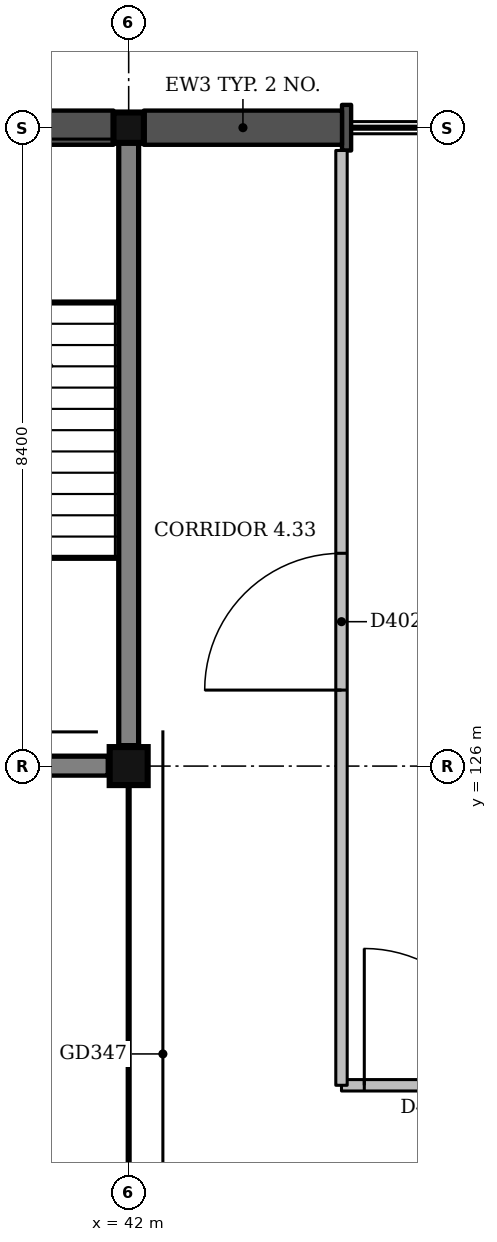
"""IFC4 building model, lengths in metres.
Left out: names, types, materials, properties, quantities, classifications, styles, units other than length and angle.
Written with IfcOpenShell. Run it as: python <this file> out.ifc"""

import sys

from ifc_helpers import new_model, si_unit, direction, frame, frame_2d, origin, origin_2d, place, context, subcontext, project, spatial, rectangle, extrude, element, fill, save


model = new_model("IFC4")
c1 = context("Model", 3, precision=1e-05, world=origin(), true_north=direction((0.0, 1.0)))
c2 = subcontext(c1, "Body", "Model", "MODEL_VIEW")
j1 = project(units=[si_unit("LENGTHUNIT", "METRE"), si_unit("PLANEANGLEUNIT", "RADIAN")], contexts=[c1])
p1 = place(None, origin())
s1 = spatial("IfcSite", under=j1, at=p1, CompositionType="ELEMENT")
p2 = place(p1, origin())
s2 = spatial("IfcBuilding", under=s1, at=p2, CompositionType="ELEMENT")
p3 = place(p2, frame((0.0, 0.0, 18.0)))
s3 = spatial("IfcBuildingStorey", under=s2, at=p3, CompositionType="ELEMENT", Elevation=18.0)
p4 = place(p3, frame((42.0, 126.0, 0.0), z_axis=(0.0, 0.0, 1.0), x_axis=(1.0, 0.0, 0.0)))
e1 = element("IfcColumn", 1, at=p4, inside=s3, PredefinedType="COLUMN", context=c2, shape_type="SweptSolid", body=[
    extrude(rectangle(XDim=0.5, YDim=0.5, at=origin_2d()), origin(), (0.0, 0.0, 1.0), 4.5),
])
p5 = place(p3, frame((42.0, 134.4, 0.0), z_axis=(0.0, 0.0, 1.0), x_axis=(1.0, 0.0, 0.0)))
e2 = element("IfcColumn", 2, at=p5, inside=s3, PredefinedType="COLUMN", context=c2, shape_type="SweptSolid", body=[
    extrude(rectangle(XDim=0.4, YDim=0.4, at=origin_2d()), origin(), (0.0, 0.0, 1.0), 4.5),
])
p6 = place(p3, frame((36.275, 126.0, 0.0), z_axis=(0.0, 0.0, 1.0), x_axis=(1.0, 0.0, 0.0)))
e3 = element("IfcWall", 3, at=p6, inside=s3, PredefinedType="SHEAR", context=c2, shape_type="SweptSolid", body=[
    extrude(rectangle(XDim=5.45, YDim=0.25, at=frame_2d((2.725, 0.0))), origin(), (0.0, 0.0, 1.0), 4.5),
])
p7 = place(p3, frame((42.0, 126.275, 0.0), z_axis=(0.0, 0.0, 1.0), x_axis=(0.0, 1.0, 0.0)))
e4 = element("IfcWall", 4, at=p7, inside=s3, PredefinedType="SHEAR", context=c2, shape_type="SweptSolid", body=[
    extrude(rectangle(XDim=7.925, YDim=0.25, at=frame_2d((3.962, 0.0))), origin(), (0.0, 0.0, 1.0), 4.5),
])
p8 = place(p3, frame((44.927, 134.4, 0.0), z_axis=(0.0, 0.0, 1.0), x_axis=(-1.0, 0.0, 0.0)))
e5 = element("IfcWall", 5, at=p8, inside=s3, PredefinedType="SOLIDWALL", context=c2, shape_type="SweptSolid", body=[
    extrude(rectangle(XDim=0.12, YDim=0.6, at=frame_2d((0.06, 0.0))), origin(), (0.0, 0.0, 1.0), 3.35),
])
for number, where, z_axis, x_axis in (
    (6, (44.807, 134.4, 0.0), (0.0, 0.0, 1.0), (-1.0, 0.0, 0.0)),
    (7, (41.8, 134.4, 0.0), (0.0, 0.0, 1.0), (-1.0, 0.0, 0.0)),
):
    element("IfcWall", number, at=place(p3, frame(where, z_axis=z_axis, x_axis=x_axis)), inside=s3, PredefinedType="SOLIDWALL", context=c2, shape_type="SweptSolid", body=[
        extrude(rectangle(XDim=2.607, YDim=0.45, at=frame_2d((1.303, 0.0))), origin(), (0.0, 0.0, 1.0), 3.35),
    ])
p9 = place(p3, frame((44.8, 121.8, 0.0), z_axis=(0.0, 0.0, 1.0), x_axis=(1.0, 0.0, 0.0)))
e8 = element("IfcWall", 8, at=p9, inside=s3, PredefinedType="PARTITIONING", context=c2, shape_type="SweptSolid", body=[
    extrude(rectangle(XDim=28.0, YDim=0.15, at=frame_2d((14.0, 0.0))), origin(), (0.0, 0.0, 1.0), 3.35),
])
p10 = place(p9, frame((0.3, 0.0, 0.0)))
e9 = element("IfcOpeningElement", 9, at=p10, cuts=e8, PredefinedType="OPENING", context=c2, shape_type="SweptSolid", body=[
    extrude(rectangle(XDim=1.8, YDim=2.1, at=frame_2d((0.9, 1.05))), frame((0.0, 0.085, 0.0), z_axis=(0.0, -1.0, 0.0), x_axis=(1.0, 0.0, 0.0)), (0.0, 0.0, 1.0), 0.17),
])
p11 = place(p9, frame((20.25, 0.0, 0.0)))
e10 = element("IfcOpeningElement", 10, at=p11, cuts=e8, PredefinedType="OPENING", context=c2, shape_type="SweptSolid", body=[
    extrude(rectangle(XDim=1.8, YDim=2.1, at=frame_2d((0.9, 1.05))), frame((0.0, 0.085, 0.0), z_axis=(0.0, -1.0, 0.0), x_axis=(1.0, 0.0, 0.0)), (0.0, 0.0, 1.0), 0.17),
])
p12 = place(p3, frame((44.8, 121.8, 0.0), z_axis=(0.0, 0.0, 1.0), x_axis=(0.0, 1.0, 0.0)))
e11 = element("IfcWall", 11, at=p12, inside=s3, PredefinedType="PARTITIONING", context=c2, shape_type="SweptSolid", body=[
    extrude(rectangle(XDim=12.3, YDim=0.15, at=frame_2d((6.15, 0.0))), origin(), (0.0, 0.0, 1.0), 3.4),
])
p13 = place(p12, frame((5.2, 0.0, 0.0)))
e12 = element("IfcOpeningElement", 12, at=p13, cuts=e11, PredefinedType="OPENING", context=c2, shape_type="SweptSolid", body=[
    extrude(rectangle(XDim=1.8, YDim=2.1, at=frame_2d((0.9, 1.05))), frame((0.0, 0.085, 0.0), z_axis=(0.0, -1.0, 0.0), x_axis=(1.0, 0.0, 0.0)), (0.0, 0.0, 1.0), 0.17),
])
p14 = place(p13, origin())
e13 = element("IfcDoor", 13, at=p14, inside=s3, OperationType="DOUBLE_DOOR_SINGLE_SWING", PredefinedType="DOOR", context=c2, shape_type="SweptSolid", body=[
    extrude(rectangle(XDim=1.8, YDim=2.1, at=frame_2d((0.9, 1.05))), frame((0.0, 0.025, 0.0), z_axis=(0.0, -1.0, 0.0), x_axis=(1.0, 0.0, 0.0)), (0.0, 0.0, 1.0), 0.05),
])
fill(e12, e13)
p15 = place(p10, origin())
e14 = element("IfcDoor", 14, at=p15, inside=s3, OperationType="DOUBLE_DOOR_SINGLE_SWING", PredefinedType="DOOR", context=c2, shape_type="SweptSolid", body=[
    extrude(rectangle(XDim=1.8, YDim=2.1, at=frame_2d((0.9, 1.05))), frame((0.0, 0.025, 0.0), z_axis=(0.0, -1.0, 0.0), x_axis=(1.0, 0.0, 0.0)), (0.0, 0.0, 1.0), 0.05),
])
fill(e9, e14)
save(model, sys.argv[1])
